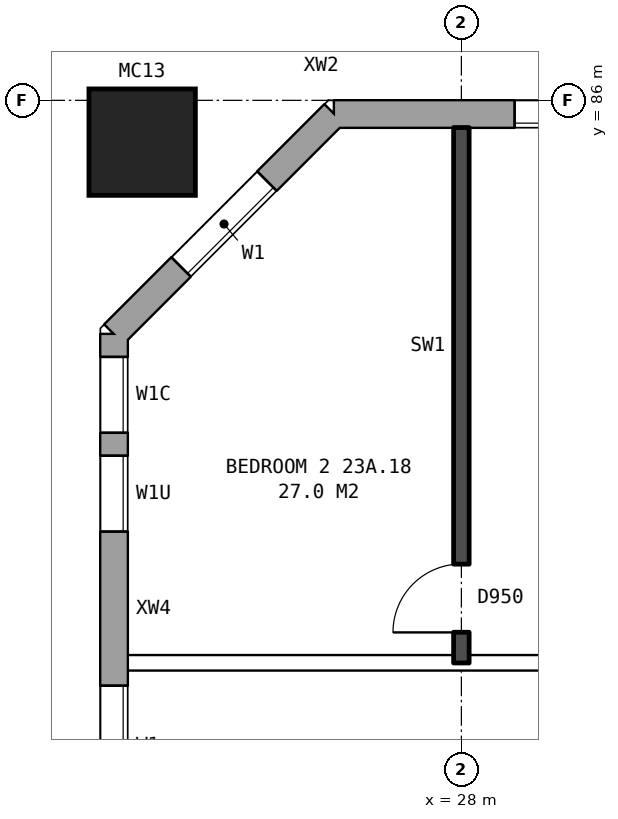
"""IFC4 building model, lengths in metres.
Left out: names, types, materials, properties, quantities, classifications, styles, units other than length and angle.
Written with IfcOpenShell. Run it as: python <this file> out.ifc"""

import sys

from ifc_helpers import new_model, si_unit, direction, frame, frame_2d, origin, origin_2d, place, context, subcontext, project, spatial, rectangle, hollow_rectangle, extrude, element, fill, save


model = new_model("IFC4")
c1 = context("Model", 3, precision=1e-05, world=origin(), true_north=direction((0.0, 1.0)))
c2 = subcontext(c1, "Body", "Model", "MODEL_VIEW")
j1 = project(units=[si_unit("LENGTHUNIT", "METRE"), si_unit("PLANEANGLEUNIT", "RADIAN")], contexts=[c1])
p1 = place(None, origin())
s1 = spatial("IfcSite", under=j1, at=p1, CompositionType="ELEMENT")
p2 = place(p1, origin())
s2 = spatial("IfcBuilding", under=s1, at=p2, CompositionType="ELEMENT")
p3 = place(p2, frame((0.0, 0.0, 84.0)))
s3 = spatial("IfcBuildingStorey", under=s2, at=p3, CompositionType="ELEMENT", Elevation=84.0)
p4 = place(p3, frame((23.8, 85.45, 0.0), z_axis=(0.0, 0.0, 1.0), x_axis=(1.0, 0.0, 0.0)))
e1 = element("IfcColumn", 1, at=p4, inside=s3, PredefinedType="COLUMN", context=c2, shape_type="SweptSolid", body=[
    extrude(hollow_rectangle(XDim=1.4, YDim=1.4, WallThickness=0.075, at=origin_2d()), origin(), (0.0, 0.0, 1.0), 3.1),
])
p5 = place(p3, frame((72.925, 85.82, 0.0), z_axis=(0.0, 0.0, 1.0), x_axis=(-1.0, 0.0, 0.0)))
e2 = element("IfcWall", 2, at=p5, inside=s3, PredefinedType="STANDARD", context=c2, shape_type="SweptSolid", body=[
    extrude(rectangle(XDim=46.601, YDim=0.36, at=frame_2d((23.3, 0.0))), origin(), (0.0, 0.0, 1.0), 2.85),
])
p6 = place(p5, frame((0.625, 0.0, 0.8)))
e3 = element("IfcOpeningElement", 3, at=p6, cuts=e2, PredefinedType="OPENING", context=c2, shape_type="SweptSolid", body=[
    extrude(rectangle(XDim=1.6, YDim=1.8, at=frame_2d((0.8, 0.9))), frame((0.0, 0.19, 0.0), z_axis=(0.0, -1.0, 0.0), x_axis=(1.0, 0.0, 0.0)), (0.0, 0.0, 1.0), 0.38),
])
p7 = place(p5, frame((3.625, 0.0, 0.8)))
e4 = element("IfcOpeningElement", 4, at=p7, cuts=e2, PredefinedType="OPENING", context=c2, shape_type="SweptSolid", body=[
    extrude(rectangle(XDim=1.6, YDim=1.8, at=frame_2d((0.8, 0.9))), frame((0.0, 0.19, 0.0), z_axis=(0.0, -1.0, 0.0), x_axis=(1.0, 0.0, 0.0)), (0.0, 0.0, 1.0), 0.38),
])
p8 = place(p5, frame((6.625, 0.0, 0.8)))
e5 = element("IfcOpeningElement", 5, at=p8, cuts=e2, PredefinedType="OPENING", context=c2, shape_type="SweptSolid", body=[
    extrude(rectangle(XDim=1.6, YDim=1.8, at=frame_2d((0.8, 0.9))), frame((0.0, 0.19, 0.0), z_axis=(0.0, -1.0, 0.0), x_axis=(1.0, 0.0, 0.0)), (0.0, 0.0, 1.0), 0.38),
])
p9 = place(p5, frame((9.625, 0.0, 0.8)))
e6 = element("IfcOpeningElement", 6, at=p9, cuts=e2, PredefinedType="OPENING", context=c2, shape_type="SweptSolid", body=[
    extrude(rectangle(XDim=1.6, YDim=1.8, at=frame_2d((0.8, 0.9))), frame((0.0, 0.19, 0.0), z_axis=(0.0, -1.0, 0.0), x_axis=(1.0, 0.0, 0.0)), (0.0, 0.0, 1.0), 0.38),
])
p10 = place(p5, frame((12.625, 0.0, 0.8)))
e7 = element("IfcOpeningElement", 7, at=p10, cuts=e2, PredefinedType="OPENING", context=c2, shape_type="SweptSolid", body=[
    extrude(rectangle(XDim=1.6, YDim=1.8, at=frame_2d((0.8, 0.9))), frame((0.0, 0.19, 0.0), z_axis=(0.0, -1.0, 0.0), x_axis=(1.0, 0.0, 0.0)), (0.0, 0.0, 1.0), 0.38),
])
p11 = place(p5, frame((15.125, 0.0, 0.8)))
e8 = element("IfcOpeningElement", 8, at=p11, cuts=e2, PredefinedType="OPENING", context=c2, shape_type="SweptSolid", body=[
    extrude(rectangle(XDim=1.6, YDim=1.8, at=frame_2d((0.8, 0.9))), frame((0.0, 0.19, 0.0), z_axis=(0.0, -1.0, 0.0), x_axis=(1.0, 0.0, 0.0)), (0.0, 0.0, 1.0), 0.38),
])
p12 = place(p5, frame((18.625, 0.0, 0.35)))
e9 = element("IfcOpeningElement", 9, at=p12, cuts=e2, PredefinedType="OPENING", context=c2, shape_type="SweptSolid", body=[
    extrude(rectangle(XDim=0.8, YDim=0.9, at=frame_2d((0.4, 0.45))), frame((0.0, 0.19, 0.0), z_axis=(0.0, -1.0, 0.0), x_axis=(1.0, 0.0, 0.0)), (0.0, 0.0, 1.0), 0.38),
])
p13 = place(p5, frame((21.625, 0.0, 0.8)))
e10 = element("IfcOpeningElement", 10, at=p13, cuts=e2, PredefinedType="OPENING", context=c2, shape_type="SweptSolid", body=[
    extrude(rectangle(XDim=1.6, YDim=1.8, at=frame_2d((0.8, 0.9))), frame((0.0, 0.19, 0.0), z_axis=(0.0, -1.0, 0.0), x_axis=(1.0, 0.0, 0.0)), (0.0, 0.0, 1.0), 0.38),
])
p14 = place(p5, frame((24.625, 0.0, 0.8)))
e11 = element("IfcOpeningElement", 11, at=p14, cuts=e2, PredefinedType="OPENING", context=c2, shape_type="SweptSolid", body=[
    extrude(rectangle(XDim=1.6, YDim=1.8, at=frame_2d((0.8, 0.9))), frame((0.0, 0.19, 0.0), z_axis=(0.0, -1.0, 0.0), x_axis=(1.0, 0.0, 0.0)), (0.0, 0.0, 1.0), 0.38),
])
p15 = place(p5, frame((29.075, 0.0, 1.4)))
e12 = element("IfcOpeningElement", 12, at=p15, cuts=e2, PredefinedType="OPENING", context=c2, shape_type="SweptSolid", body=[
    extrude(rectangle(XDim=1.2, YDim=1.2, at=frame_2d((0.6, 0.6))), frame((0.0, 0.19, 0.0), z_axis=(0.0, -1.0, 0.0), x_axis=(1.0, 0.0, 0.0)), (0.0, 0.0, 1.0), 0.38),
])
p16 = place(p5, frame((30.625, 0.0, 0.8)))
e13 = element("IfcOpeningElement", 13, at=p16, cuts=e2, PredefinedType="OPENING", context=c2, shape_type="SweptSolid", body=[
    extrude(rectangle(XDim=1.6, YDim=1.8, at=frame_2d((0.8, 0.9))), frame((0.0, 0.19, 0.0), z_axis=(0.0, -1.0, 0.0), x_axis=(1.0, 0.0, 0.0)), (0.0, 0.0, 1.0), 0.38),
])
p17 = place(p5, frame((33.625, 0.0, 0.8)))
e14 = element("IfcOpeningElement", 14, at=p17, cuts=e2, PredefinedType="OPENING", context=c2, shape_type="SweptSolid", body=[
    extrude(rectangle(XDim=1.6, YDim=1.8, at=frame_2d((0.8, 0.9))), frame((0.0, 0.19, 0.0), z_axis=(0.0, -1.0, 0.0), x_axis=(1.0, 0.0, 0.0)), (0.0, 0.0, 1.0), 0.38),
])
p18 = place(p5, frame((36.625, 0.0, 0.8)))
e15 = element("IfcOpeningElement", 15, at=p18, cuts=e2, PredefinedType="OPENING", context=c2, shape_type="SweptSolid", body=[
    extrude(rectangle(XDim=1.6, YDim=1.8, at=frame_2d((0.8, 0.9))), frame((0.0, 0.19, 0.0), z_axis=(0.0, -1.0, 0.0), x_axis=(1.0, 0.0, 0.0)), (0.0, 0.0, 1.0), 0.38),
])
p19 = place(p5, frame((39.625, 0.0, 0.8)))
e16 = element("IfcOpeningElement", 16, at=p19, cuts=e2, PredefinedType="OPENING", context=c2, shape_type="SweptSolid", body=[
    extrude(rectangle(XDim=1.6, YDim=1.8, at=frame_2d((0.8, 0.9))), frame((0.0, 0.19, 0.0), z_axis=(0.0, -1.0, 0.0), x_axis=(1.0, 0.0, 0.0)), (0.0, 0.0, 1.0), 0.38),
])
p20 = place(p5, frame((42.625, 0.0, 0.8)))
e17 = element("IfcOpeningElement", 17, at=p20, cuts=e2, PredefinedType="OPENING", context=c2, shape_type="SweptSolid", body=[
    extrude(rectangle(XDim=1.6, YDim=1.8, at=frame_2d((0.8, 0.9))), frame((0.0, 0.19, 0.0), z_axis=(0.0, -1.0, 0.0), x_axis=(1.0, 0.0, 0.0)), (0.0, 0.0, 1.0), 0.38),
])
p21 = place(p5, frame((17.025, 0.0, 1.5)))
e18 = element("IfcOpeningElement", 18, at=p21, cuts=e2, PredefinedType="OPENING", context=c2, shape_type="SweptSolid", body=[
    extrude(rectangle(XDim=0.6, YDim=0.9, at=frame_2d((0.3, 0.45))), frame((0.0, 0.19, 0.0), z_axis=(0.0, -1.0, 0.0), x_axis=(1.0, 0.0, 0.0)), (0.0, 0.0, 1.0), 0.38),
])
p22 = place(p5, frame((19.725, 0.0, 0.35)))
e19 = element("IfcOpeningElement", 19, at=p22, cuts=e2, PredefinedType="OPENING", context=c2, shape_type="SweptSolid", body=[
    extrude(rectangle(XDim=1.0, YDim=1.8, at=frame_2d((0.5, 0.9))), frame((0.0, 0.19, 0.0), z_axis=(0.0, -1.0, 0.0), x_axis=(1.0, 0.0, 0.0)), (0.0, 0.0, 1.0), 0.38),
])
p23 = place(p3, frame((26.325, 85.82, 0.0), z_axis=(0.0, 0.0, 1.0), x_axis=(-0.707106781187, -0.707106781187, 0.0)))
e20 = element("IfcWall", 20, at=p23, inside=s3, PredefinedType="STANDARD", context=c2, shape_type="SweptSolid", body=[
    extrude(rectangle(XDim=4.094, YDim=0.36, at=frame_2d((2.047, 0.0))), origin(), (0.0, 0.0, 1.0), 2.85),
])
p24 = place(p23, frame((1.247, 0.0, 0.8)))
e21 = element("IfcOpeningElement", 21, at=p24, cuts=e20, PredefinedType="OPENING", context=c2, shape_type="SweptSolid", body=[
    extrude(rectangle(XDim=1.6, YDim=1.8, at=frame_2d((0.8, 0.9))), frame((0.0, 0.19, 0.0), z_axis=(0.0, -1.0, 0.0), x_axis=(1.0, 0.0, 0.0)), (0.0, 0.0, 1.0), 0.38),
])
p25 = place(p3, frame((23.43, 82.925, 0.0), z_axis=(0.0, 0.0, 1.0), x_axis=(0.0, -1.0, 0.0)))
e22 = element("IfcWall", 22, at=p25, inside=s3, PredefinedType="STANDARD", context=c2, shape_type="SweptSolid", body=[
    extrude(rectangle(XDim=25.851, YDim=0.36, at=frame_2d((12.925, 0.0))), origin(), (0.0, 0.0, 1.0), 2.85),
])
p26 = place(p25, frame((0.3, 0.0, 0.8)))
e23 = element("IfcOpeningElement", 23, at=p26, cuts=e22, PredefinedType="OPENING", context=c2, shape_type="SweptSolid", body=[
    extrude(rectangle(XDim=1.0, YDim=1.8, at=frame_2d((0.5, 0.9))), frame((0.0, 0.19, 0.0), z_axis=(0.0, -1.0, 0.0), x_axis=(1.0, 0.0, 0.0)), (0.0, 0.0, 1.0), 0.38),
])
p27 = place(p25, frame((4.625, 0.0, 0.8)))
e24 = element("IfcOpeningElement", 24, at=p27, cuts=e22, PredefinedType="OPENING", context=c2, shape_type="SweptSolid", body=[
    extrude(rectangle(XDim=1.6, YDim=1.8, at=frame_2d((0.8, 0.9))), frame((0.0, 0.19, 0.0), z_axis=(0.0, -1.0, 0.0), x_axis=(1.0, 0.0, 0.0)), (0.0, 0.0, 1.0), 0.38),
])
p28 = place(p25, frame((7.625, 0.0, 0.8)))
e25 = element("IfcOpeningElement", 25, at=p28, cuts=e22, PredefinedType="OPENING", context=c2, shape_type="SweptSolid", body=[
    extrude(rectangle(XDim=1.6, YDim=1.8, at=frame_2d((0.8, 0.9))), frame((0.0, 0.19, 0.0), z_axis=(0.0, -1.0, 0.0), x_axis=(1.0, 0.0, 0.0)), (0.0, 0.0, 1.0), 0.38),
])
p29 = place(p25, frame((10.625, 0.0, 0.8)))
e26 = element("IfcOpeningElement", 26, at=p29, cuts=e22, PredefinedType="OPENING", context=c2, shape_type="SweptSolid", body=[
    extrude(rectangle(XDim=1.6, YDim=1.8, at=frame_2d((0.8, 0.9))), frame((0.0, 0.19, 0.0), z_axis=(0.0, -1.0, 0.0), x_axis=(1.0, 0.0, 0.0)), (0.0, 0.0, 1.0), 0.38),
])
p30 = place(p25, frame((13.625, 0.0, 0.8)))
e27 = element("IfcOpeningElement", 27, at=p30, cuts=e22, PredefinedType="OPENING", context=c2, shape_type="SweptSolid", body=[
    extrude(rectangle(XDim=1.6, YDim=1.8, at=frame_2d((0.8, 0.9))), frame((0.0, 0.19, 0.0), z_axis=(0.0, -1.0, 0.0), x_axis=(1.0, 0.0, 0.0)), (0.0, 0.0, 1.0), 0.38),
])
p31 = place(p25, frame((16.625, 0.0, 0.8)))
e28 = element("IfcOpeningElement", 28, at=p31, cuts=e22, PredefinedType="OPENING", context=c2, shape_type="SweptSolid", body=[
    extrude(rectangle(XDim=1.6, YDim=1.8, at=frame_2d((0.8, 0.9))), frame((0.0, 0.19, 0.0), z_axis=(0.0, -1.0, 0.0), x_axis=(1.0, 0.0, 0.0)), (0.0, 0.0, 1.0), 0.38),
])
p32 = place(p25, frame((19.625, 0.0, 0.8)))
e29 = element("IfcOpeningElement", 29, at=p32, cuts=e22, PredefinedType="OPENING", context=c2, shape_type="SweptSolid", body=[
    extrude(rectangle(XDim=1.6, YDim=1.8, at=frame_2d((0.8, 0.9))), frame((0.0, 0.19, 0.0), z_axis=(0.0, -1.0, 0.0), x_axis=(1.0, 0.0, 0.0)), (0.0, 0.0, 1.0), 0.38),
])
p33 = place(p25, frame((23.125, 0.0, 0.8)))
e30 = element("IfcOpeningElement", 30, at=p33, cuts=e22, PredefinedType="OPENING", context=c2, shape_type="SweptSolid", body=[
    extrude(rectangle(XDim=1.0, YDim=0.9, at=frame_2d((0.5, 0.45))), frame((0.0, 0.19, 0.0), z_axis=(0.0, -1.0, 0.0), x_axis=(1.0, 0.0, 0.0)), (0.0, 0.0, 1.0), 0.38),
])
p34 = place(p25, frame((1.6, 0.0, 0.8)))
e31 = element("IfcOpeningElement", 31, at=p34, cuts=e22, PredefinedType="OPENING", context=c2, shape_type="SweptSolid", body=[
    extrude(rectangle(XDim=1.0, YDim=0.9, at=frame_2d((0.5, 0.45))), frame((0.0, 0.19, 0.0), z_axis=(0.0, -1.0, 0.0), x_axis=(1.0, 0.0, 0.0)), (0.0, 0.0, 1.0), 0.38),
])
p35 = place(p25, frame((24.425, 0.0, 0.8)))
e32 = element("IfcOpeningElement", 32, at=p35, cuts=e22, PredefinedType="OPENING", context=c2, shape_type="SweptSolid", body=[
    extrude(rectangle(XDim=1.0, YDim=1.8, at=frame_2d((0.5, 0.9))), frame((0.0, 0.19, 0.0), z_axis=(0.0, -1.0, 0.0), x_axis=(1.0, 0.0, 0.0)), (0.0, 0.0, 1.0), 0.38),
])
p36 = place(p3, frame((23.61, 78.6, 0.0), z_axis=(0.0, 0.0, 1.0), x_axis=(1.0, 0.0, 0.0)))
e33 = element("IfcWall", 33, at=p36, inside=s3, PredefinedType="PARTITIONING", context=c2, shape_type="SweptSolid", body=[
    extrude(rectangle(XDim=22.29, YDim=0.2, at=frame_2d((11.145, 0.0))), origin(), (0.0, 0.0, 1.0), 2.85),
])
p37 = place(p36, frame((18.84, 0.0, 0.0)))
e34 = element("IfcOpeningElement", 34, at=p37, cuts=e33, PredefinedType="OPENING", context=c2, shape_type="SweptSolid", body=[
    extrude(rectangle(XDim=1.0, YDim=2.1, at=frame_2d((0.5, 1.05))), frame((0.0, 0.11, 0.0), z_axis=(0.0, -1.0, 0.0), x_axis=(1.0, 0.0, 0.0)), (0.0, 0.0, 1.0), 0.22),
])
p38 = place(p36, frame((6.89, 0.0, 0.0)))
e35 = element("IfcOpeningElement", 35, at=p38, cuts=e33, PredefinedType="OPENING", context=c2, shape_type="SweptSolid", body=[
    extrude(rectangle(XDim=1.0, YDim=2.1, at=frame_2d((0.5, 1.05))), frame((0.0, 0.11, 0.0), z_axis=(0.0, -1.0, 0.0), x_axis=(1.0, 0.0, 0.0)), (0.0, 0.0, 1.0), 0.22),
])
p39 = place(p3, frame((28.0, 78.6, 0.0), z_axis=(0.0, 0.0, 1.0), x_axis=(0.0, 1.0, 0.0)))
e36 = element("IfcWall", 36, at=p39, inside=s3, PredefinedType="SOLIDWALL", context=c2, shape_type="SweptSolid", body=[
    extrude(rectangle(XDim=7.04, YDim=0.2, at=frame_2d((3.52, 0.0))), origin(), (0.0, 0.0, 1.0), 2.85),
])
p40 = place(p39, frame((0.4, 0.0, 0.0)))
e37 = element("IfcOpeningElement", 37, at=p40, cuts=e36, PredefinedType="OPENING", context=c2, shape_type="SweptSolid", body=[
    extrude(rectangle(XDim=0.9, YDim=2.1, at=frame_2d((0.45, 1.05))), frame((0.0, 0.11, 0.0), z_axis=(0.0, -1.0, 0.0), x_axis=(1.0, 0.0, 0.0)), (0.0, 0.0, 1.0), 0.22),
])
p41 = place(p20, origin())
e38 = element("IfcWindow", 38, at=p41, inside=s3, PartitioningType="SINGLE_PANEL", PredefinedType="WINDOW", context=c2, shape_type="SweptSolid", body=[
    extrude(rectangle(XDim=1.6, YDim=1.8, at=frame_2d((0.8, 0.9))), frame((0.0, 0.15, 0.0), z_axis=(0.0, -1.0, 0.0), x_axis=(1.0, 0.0, 0.0)), (0.0, 0.0, 1.0), 0.06),
])
fill(e17, e38)
p42 = place(p24, origin())
e39 = element("IfcWindow", 39, at=p42, inside=s3, PartitioningType="SINGLE_PANEL", PredefinedType="WINDOW", context=c2, shape_type="SweptSolid", body=[
    extrude(rectangle(XDim=1.6, YDim=1.8, at=frame_2d((0.8, 0.9))), frame((0.0, 0.15, 0.0), z_axis=(0.0, -1.0, 0.0), x_axis=(1.0, 0.0, 0.0)), (0.0, 0.0, 1.0), 0.06),
])
fill(e21, e39)
p43 = place(p26, origin())
e40 = element("IfcWindow", 40, at=p43, inside=s3, PartitioningType="SINGLE_PANEL", PredefinedType="WINDOW", context=c2, shape_type="SweptSolid", body=[
    extrude(rectangle(XDim=1.0, YDim=1.8, at=frame_2d((0.5, 0.9))), frame((0.0, 0.15, 0.0), z_axis=(0.0, -1.0, 0.0), x_axis=(1.0, 0.0, 0.0)), (0.0, 0.0, 1.0), 0.06),
])
fill(e23, e40)
p44 = place(p27, origin())
e41 = element("IfcWindow", 41, at=p44, inside=s3, PartitioningType="SINGLE_PANEL", PredefinedType="WINDOW", context=c2, shape_type="SweptSolid", body=[
    extrude(rectangle(XDim=1.6, YDim=1.8, at=frame_2d((0.8, 0.9))), frame((0.0, 0.15, 0.0), z_axis=(0.0, -1.0, 0.0), x_axis=(1.0, 0.0, 0.0)), (0.0, 0.0, 1.0), 0.06),
])
fill(e24, e41)
p45 = place(p40, origin())
e42 = element("IfcDoor", 42, at=p45, inside=s3, OperationType="SINGLE_SWING_LEFT", PredefinedType="DOOR", context=c2, shape_type="SweptSolid", body=[
    extrude(rectangle(XDim=0.9, YDim=2.1, at=frame_2d((0.45, 1.05))), frame((0.0, 0.025, 0.0), z_axis=(0.0, -1.0, 0.0), x_axis=(1.0, 0.0, 0.0)), (0.0, 0.0, 1.0), 0.05),
])
fill(e37, e42)
p46 = place(p34, origin())
e43 = element("IfcWindow", 43, at=p46, inside=s3, PartitioningType="SINGLE_PANEL", PredefinedType="WINDOW", context=c2, shape_type="SweptSolid", body=[
    extrude(rectangle(XDim=1.0, YDim=0.9, at=frame_2d((0.5, 0.45))), frame((0.0, 0.15, 0.0), z_axis=(0.0, -1.0, 0.0), x_axis=(1.0, 0.0, 0.0)), (0.0, 0.0, 1.0), 0.06),
])
fill(e31, e43)
save(model, sys.argv[1])
